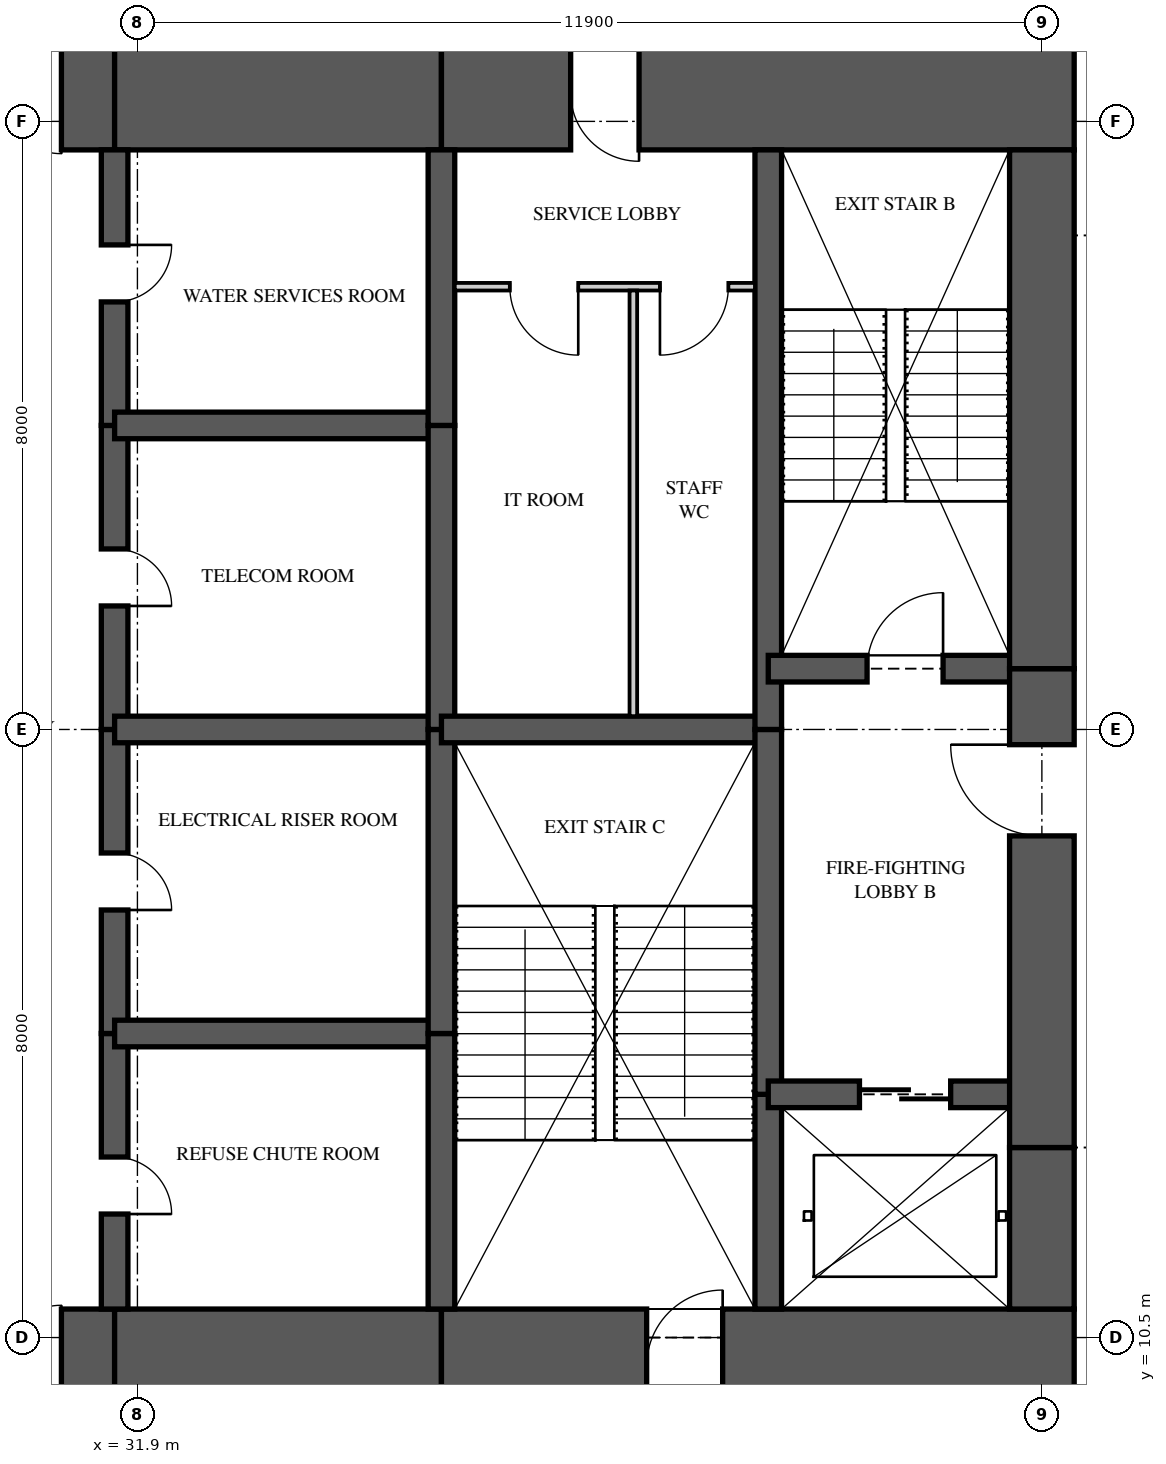
"""IFC4 building model, lengths in metres.
Left out: names, types, materials, properties, quantities, classifications, styles, units other than length and angle.
Written with IfcOpenShell. Run it as: python <this file> out.ifc"""

import sys

from ifc_helpers import new_model, si_unit, direction, frame, frame_2d, origin, place, context, subcontext, project, spatial, rectangle, extrude, element, fill, save


model = new_model("IFC4")
c1 = context("Model", 3, precision=1e-05, world=origin(), true_north=direction((0.0, 1.0)))
c2 = subcontext(c1, "Body", "Model", "MODEL_VIEW")
j1 = project(units=[si_unit("LENGTHUNIT", "METRE"), si_unit("PLANEANGLEUNIT", "RADIAN")], contexts=[c1])
p1 = place(None, origin())
s1 = spatial("IfcSite", under=j1, at=p1, CompositionType="ELEMENT")
p2 = place(p1, origin())
s2 = spatial("IfcBuilding", under=s1, at=p2, CompositionType="ELEMENT")
p3 = place(p2, frame((0.0, 0.0, 121.6)))
s3 = spatial("IfcBuildingStorey", under=s2, at=p3, CompositionType="ELEMENT", Elevation=121.6)
p4 = place(p3, frame((26.0, 10.125, 0.0), z_axis=(0.0, 0.0, 1.0), x_axis=(1.0, 0.0, 0.0)))
e1 = element("IfcWall", 1, at=p4, inside=s3, PredefinedType="SHEAR", context=c2, shape_type="SweptSolid", body=[
    extrude(rectangle(XDim=5.6, YDim=1.5, at=frame_2d((2.8, 0.0))), origin(), (0.0, 0.0, 1.0), 3.35),
])
p5 = place(p4, frame((3.3, 0.0, 0.0)))
e2 = element("IfcOpeningElement", 2, at=p5, cuts=e1, PredefinedType="OPENING", context=c2, shape_type="SweptSolid", body=[
    extrude(rectangle(XDim=1.6, YDim=2.1, at=frame_2d((0.8, 1.05))), frame((0.0, 0.76, 0.0), z_axis=(0.0, -1.0, 0.0), x_axis=(1.0, 0.0, 0.0)), (0.0, 0.0, 1.0), 1.52),
])
p6 = place(p3, frame((31.6, 10.125, 0.0), z_axis=(0.0, 0.0, 1.0), x_axis=(1.0, 0.0, 0.0)))
e3 = element("IfcWall", 3, at=p6, inside=s3, PredefinedType="SHEAR", context=c2, shape_type="SweptSolid", body=[
    extrude(rectangle(XDim=4.3, YDim=1.5, at=frame_2d((2.15, 0.0))), origin(), (0.0, 0.0, 1.0), 3.35),
])
p7 = place(p3, frame((35.9, 10.125, 0.0), z_axis=(0.0, 0.0, 1.0), x_axis=(1.0, 0.0, 0.0)))
e4 = element("IfcWall", 4, at=p7, inside=s3, PredefinedType="SHEAR", context=c2, shape_type="SweptSolid", body=[
    extrude(rectangle(XDim=8.325, YDim=1.5, at=frame_2d((4.163, 0.0))), origin(), (0.0, 0.0, 1.0), 3.35),
])
p8 = place(p7, frame((2.7, 0.0, 0.0)))
e5 = element("IfcOpeningElement", 5, at=p8, cuts=e4, PredefinedType="OPENING", context=c2, shape_type="SweptSolid", body=[
    extrude(rectangle(XDim=1.0, YDim=2.1, at=frame_2d((0.5, 1.05))), frame((0.0, 0.76, 0.0), z_axis=(0.0, -1.0, 0.0), x_axis=(1.0, 0.0, 0.0)), (0.0, 0.0, 1.0), 1.52),
])
p9 = place(p3, frame((44.225, 26.875, 0.0), z_axis=(0.0, 0.0, 1.0), x_axis=(-1.0, 0.0, 0.0)))
e6 = element("IfcWall", 6, at=p9, inside=s3, PredefinedType="SHEAR", context=c2, shape_type="SweptSolid", body=[
    extrude(rectangle(XDim=8.325, YDim=1.5, at=frame_2d((4.163, 0.0))), origin(), (0.0, 0.0, 1.0), 3.35),
])
p10 = place(p9, frame((5.725, 0.0, 0.0)))
e7 = element("IfcOpeningElement", 7, at=p10, cuts=e6, PredefinedType="OPENING", context=c2, shape_type="SweptSolid", body=[
    extrude(rectangle(XDim=0.9, YDim=2.1, at=frame_2d((0.45, 1.05))), frame((0.0, 0.76, 0.0), z_axis=(0.0, -1.0, 0.0), x_axis=(1.0, 0.0, 0.0)), (0.0, 0.0, 1.0), 1.52),
])
p11 = place(p3, frame((35.9, 26.875, 0.0), z_axis=(0.0, 0.0, 1.0), x_axis=(-1.0, 0.0, 0.0)))
e8 = element("IfcWall", 8, at=p11, inside=s3, PredefinedType="SHEAR", context=c2, shape_type="SweptSolid", body=[
    extrude(rectangle(XDim=4.3, YDim=1.5, at=frame_2d((2.15, 0.0))), origin(), (0.0, 0.0, 1.0), 3.35),
])
p12 = place(p3, frame((31.6, 26.875, 0.0), z_axis=(0.0, 0.0, 1.0), x_axis=(-1.0, 0.0, 0.0)))
e9 = element("IfcWall", 9, at=p12, inside=s3, PredefinedType="SHEAR", context=c2, shape_type="SweptSolid", body=[
    extrude(rectangle(XDim=5.6, YDim=1.5, at=frame_2d((2.8, 0.0))), origin(), (0.0, 0.0, 1.0), 3.35),
])
p13 = place(p12, frame((0.7, 0.0, 0.0)))
e10 = element("IfcOpeningElement", 10, at=p13, cuts=e9, PredefinedType="OPENING", context=c2, shape_type="SweptSolid", body=[
    extrude(rectangle(XDim=1.6, YDim=2.1, at=frame_2d((0.8, 1.05))), frame((0.0, 0.76, 0.0), z_axis=(0.0, -1.0, 0.0), x_axis=(1.0, 0.0, 0.0)), (0.0, 0.0, 1.0), 1.52),
])
p14 = place(p3, frame((43.8, 10.875, 0.0), z_axis=(0.0, 0.0, 1.0), x_axis=(0.0, 1.0, 0.0)))
e11 = element("IfcWall", 11, at=p14, inside=s3, PredefinedType="SHEAR", context=c2, shape_type="SweptSolid", body=[
    extrude(rectangle(XDim=2.125, YDim=0.85, at=frame_2d((1.062, 0.0))), origin(), (0.0, 0.0, 1.0), 3.35),
])
p15 = place(p3, frame((43.8, 13.0, 0.0), z_axis=(0.0, 0.0, 1.0), x_axis=(0.0, 1.0, 0.0)))
e12 = element("IfcWall", 12, at=p15, inside=s3, PredefinedType="SHEAR", context=c2, shape_type="SweptSolid", body=[
    extrude(rectangle(XDim=6.3, YDim=0.85, at=frame_2d((3.15, 0.0))), origin(), (0.0, 0.0, 1.0), 3.35),
])
p16 = place(p15, frame((4.1, 0.0, 0.0)))
e13 = element("IfcOpeningElement", 13, at=p16, cuts=e12, PredefinedType="OPENING", context=c2, shape_type="SweptSolid", body=[
    extrude(rectangle(XDim=1.2, YDim=2.2, at=frame_2d((0.6, 1.1))), frame((0.0, 0.435, 0.0), z_axis=(0.0, -1.0, 0.0), x_axis=(1.0, 0.0, 0.0)), (0.0, 0.0, 1.0), 0.87),
])
p17 = place(p3, frame((43.8, 19.3, 0.0), z_axis=(0.0, 0.0, 1.0), x_axis=(0.0, 1.0, 0.0)))
e14 = element("IfcWall", 14, at=p17, inside=s3, PredefinedType="SHEAR", context=c2, shape_type="SweptSolid", body=[
    extrude(rectangle(XDim=6.825, YDim=0.85, at=frame_2d((3.413, 0.0))), origin(), (0.0, 0.0, 1.0), 3.35),
])
p18 = place(p3, frame((31.6, 10.875, 0.0), z_axis=(0.0, 0.0, 1.0), x_axis=(0.0, 1.0, 0.0)))
e15 = element("IfcWall", 15, at=p18, inside=s3, PredefinedType="SHEAR", context=c2, shape_type="SweptSolid", body=[
    extrude(rectangle(XDim=3.625, YDim=0.35, at=frame_2d((1.812, 0.0))), origin(), (0.0, 0.0, 1.0), 3.35),
])
p19 = place(p18, frame((1.25, 0.0, 0.0)))
e16 = element("IfcOpeningElement", 16, at=p19, cuts=e15, PredefinedType="OPENING", context=c2, shape_type="SweptSolid", body=[
    extrude(rectangle(XDim=0.75, YDim=2.1, at=frame_2d((0.375, 1.05))), frame((0.0, 0.185, 0.0), z_axis=(0.0, -1.0, 0.0), x_axis=(1.0, 0.0, 0.0)), (0.0, 0.0, 1.0), 0.37),
])
p20 = place(p3, frame((31.6, 14.5, 0.0), z_axis=(0.0, 0.0, 1.0), x_axis=(0.0, 1.0, 0.0)))
e17 = element("IfcWall", 17, at=p20, inside=s3, PredefinedType="SHEAR", context=c2, shape_type="SweptSolid", body=[
    extrude(rectangle(XDim=4.0, YDim=0.35, at=frame_2d((2.0, 0.0))), origin(), (0.0, 0.0, 1.0), 3.35),
])
p21 = place(p20, frame((1.625, 0.0, 0.0)))
e18 = element("IfcOpeningElement", 18, at=p21, cuts=e17, PredefinedType="OPENING", context=c2, shape_type="SweptSolid", body=[
    extrude(rectangle(XDim=0.75, YDim=2.1, at=frame_2d((0.375, 1.05))), frame((0.0, 0.185, 0.0), z_axis=(0.0, -1.0, 0.0), x_axis=(1.0, 0.0, 0.0)), (0.0, 0.0, 1.0), 0.37),
])
p22 = place(p3, frame((31.6, 18.5, 0.0), z_axis=(0.0, 0.0, 1.0), x_axis=(0.0, 1.0, 0.0)))
e19 = element("IfcWall", 19, at=p22, inside=s3, PredefinedType="SHEAR", context=c2, shape_type="SweptSolid", body=[
    extrude(rectangle(XDim=4.0, YDim=0.35, at=frame_2d((2.0, 0.0))), origin(), (0.0, 0.0, 1.0), 3.35),
])
p23 = place(p22, frame((1.625, 0.0, 0.0)))
e20 = element("IfcOpeningElement", 20, at=p23, cuts=e19, PredefinedType="OPENING", context=c2, shape_type="SweptSolid", body=[
    extrude(rectangle(XDim=0.75, YDim=2.1, at=frame_2d((0.375, 1.05))), frame((0.0, 0.185, 0.0), z_axis=(0.0, -1.0, 0.0), x_axis=(1.0, 0.0, 0.0)), (0.0, 0.0, 1.0), 0.37),
])
p24 = place(p3, frame((31.6, 22.5, 0.0), z_axis=(0.0, 0.0, 1.0), x_axis=(0.0, 1.0, 0.0)))
e21 = element("IfcWall", 21, at=p24, inside=s3, PredefinedType="SHEAR", context=c2, shape_type="SweptSolid", body=[
    extrude(rectangle(XDim=3.625, YDim=0.35, at=frame_2d((1.812, 0.0))), origin(), (0.0, 0.0, 1.0), 3.35),
])
p25 = place(p24, frame((1.625, 0.0, 0.0)))
e22 = element("IfcOpeningElement", 22, at=p25, cuts=e21, PredefinedType="OPENING", context=c2, shape_type="SweptSolid", body=[
    extrude(rectangle(XDim=0.75, YDim=2.1, at=frame_2d((0.375, 1.05))), frame((0.0, 0.185, 0.0), z_axis=(0.0, -1.0, 0.0), x_axis=(1.0, 0.0, 0.0)), (0.0, 0.0, 1.0), 0.37),
])
p26 = place(p3, frame((35.9, 10.875, 0.0), z_axis=(0.0, 0.0, 1.0), x_axis=(0.0, 1.0, 0.0)))
e23 = element("IfcWall", 23, at=p26, inside=s3, PredefinedType="SHEAR", context=c2, shape_type="SweptSolid", body=[
    extrude(rectangle(XDim=3.625, YDim=0.35, at=frame_2d((1.812, 0.0))), origin(), (0.0, 0.0, 1.0), 3.35),
])
for number, where, z_axis, x_axis in (
    (24, (35.9, 14.5, 0.0), (0.0, 0.0, 1.0), (0.0, 1.0, 0.0)),
    (25, (35.9, 18.5, 0.0), (0.0, 0.0, 1.0), (0.0, 1.0, 0.0)),
):
    element("IfcWall", number, at=place(p3, frame(where, z_axis=z_axis, x_axis=x_axis)), inside=s3, PredefinedType="SHEAR", context=c2, shape_type="SweptSolid", body=[
        extrude(rectangle(XDim=4.0, YDim=0.35, at=frame_2d((2.0, 0.0))), origin(), (0.0, 0.0, 1.0), 3.35),
    ])
p27 = place(p3, frame((35.9, 22.5, 0.0), z_axis=(0.0, 0.0, 1.0), x_axis=(0.0, 1.0, 0.0)))
e26 = element("IfcWall", 26, at=p27, inside=s3, PredefinedType="SHEAR", context=c2, shape_type="SweptSolid", body=[
    extrude(rectangle(XDim=3.625, YDim=0.35, at=frame_2d((1.812, 0.0))), origin(), (0.0, 0.0, 1.0), 3.35),
])
p28 = place(p3, frame((40.2, 10.875, 0.0), z_axis=(0.0, 0.0, 1.0), x_axis=(0.0, 1.0, 0.0)))
e27 = element("IfcWall", 27, at=p28, inside=s3, PredefinedType="SHEAR", context=c2, shape_type="SweptSolid", body=[
    extrude(rectangle(XDim=2.825, YDim=0.35, at=frame_2d((1.413, 0.0))), origin(), (0.0, 0.0, 1.0), 3.35),
])
p29 = place(p3, frame((40.2, 13.7, 0.0), z_axis=(0.0, 0.0, 1.0), x_axis=(0.0, 1.0, 0.0)))
e28 = element("IfcWall", 28, at=p29, inside=s3, PredefinedType="SHEAR", context=c2, shape_type="SweptSolid", body=[
    extrude(rectangle(XDim=4.8, YDim=0.35, at=frame_2d((2.4, 0.0))), origin(), (0.0, 0.0, 1.0), 3.35),
])
p30 = place(p3, frame((40.2, 18.5, 0.0), z_axis=(0.0, 0.0, 1.0), x_axis=(0.0, 1.0, 0.0)))
e29 = element("IfcWall", 29, at=p30, inside=s3, PredefinedType="SHEAR", context=c2, shape_type="SweptSolid", body=[
    extrude(rectangle(XDim=7.625, YDim=0.35, at=frame_2d((3.812, 0.0))), origin(), (0.0, 0.0, 1.0), 3.35),
])
for number, where, z_axis, x_axis in (
    (30, (31.6, 14.5, 0.0), (0.0, 0.0, 1.0), (1.0, 0.0, 0.0)),
    (31, (31.6, 18.5, 0.0), (0.0, 0.0, 1.0), (1.0, 0.0, 0.0)),
    (32, (31.6, 22.5, 0.0), (0.0, 0.0, 1.0), (1.0, 0.0, 0.0)),
):
    element("IfcWall", number, at=place(p3, frame(where, z_axis=z_axis, x_axis=x_axis)), inside=s3, PredefinedType="SHEAR", context=c2, shape_type="SweptSolid", body=[
        extrude(rectangle(XDim=4.3, YDim=0.35, at=frame_2d((2.15, 0.0))), origin(), (0.0, 0.0, 1.0), 3.35),
    ])
p31 = place(p3, frame((35.9, 18.5, 0.0), z_axis=(0.0, 0.0, 1.0), x_axis=(1.0, 0.0, 0.0)))
e33 = element("IfcWall", 33, at=p31, inside=s3, PredefinedType="SHEAR", context=c2, shape_type="SweptSolid", body=[
    extrude(rectangle(XDim=4.3, YDim=0.35, at=frame_2d((2.15, 0.0))), origin(), (0.0, 0.0, 1.0), 3.35),
])
p32 = place(p3, frame((40.2, 13.7, 0.0), z_axis=(0.0, 0.0, 1.0), x_axis=(1.0, 0.0, 0.0)))
e34 = element("IfcWall", 34, at=p32, inside=s3, PredefinedType="SHEAR", context=c2, shape_type="SweptSolid", body=[
    extrude(rectangle(XDim=3.6, YDim=0.35, at=frame_2d((1.8, 0.0))), origin(), (0.0, 0.0, 1.0), 3.35),
])
p33 = place(p32, frame((1.2, 0.0, 0.0)))
e35 = element("IfcOpeningElement", 35, at=p33, cuts=e34, PredefinedType="OPENING", context=c2, shape_type="SweptSolid", body=[
    extrude(rectangle(XDim=1.2, YDim=2.1, at=frame_2d((0.6, 1.05))), frame((0.0, 0.185, 0.0), z_axis=(0.0, -1.0, 0.0), x_axis=(1.0, 0.0, 0.0)), (0.0, 0.0, 1.0), 0.37),
])
p34 = place(p3, frame((40.2, 19.3, 0.0), z_axis=(0.0, 0.0, 1.0), x_axis=(1.0, 0.0, 0.0)))
e36 = element("IfcWall", 36, at=p34, inside=s3, PredefinedType="SHEAR", context=c2, shape_type="SweptSolid", body=[
    extrude(rectangle(XDim=3.6, YDim=0.35, at=frame_2d((1.8, 0.0))), origin(), (0.0, 0.0, 1.0), 3.35),
])
p35 = place(p34, frame((1.3, 0.0, 0.0)))
e37 = element("IfcOpeningElement", 37, at=p35, cuts=e36, PredefinedType="OPENING", context=c2, shape_type="SweptSolid", body=[
    extrude(rectangle(XDim=1.0, YDim=2.1, at=frame_2d((0.5, 1.05))), frame((0.0, 0.185, 0.0), z_axis=(0.0, -1.0, 0.0), x_axis=(1.0, 0.0, 0.0)), (0.0, 0.0, 1.0), 0.37),
])
p36 = place(p3, frame((36.075, 24.325, 0.0), z_axis=(0.0, 0.0, 1.0), x_axis=(1.0, 0.0, 0.0)))
e38 = element("IfcWall", 38, at=p36, inside=s3, PredefinedType="PARTITIONING", context=c2, shape_type="SweptSolid", body=[
    extrude(rectangle(XDim=3.95, YDim=0.1, at=frame_2d((1.975, 0.0))), origin(), (0.0, 0.0, 1.0), 3.11),
])
p37 = place(p36, frame((0.725, 0.0, 0.0)))
e39 = element("IfcOpeningElement", 39, at=p37, cuts=e38, PredefinedType="OPENING", context=c2, shape_type="SweptSolid", body=[
    extrude(rectangle(XDim=0.9, YDim=2.1, at=frame_2d((0.45, 1.05))), frame((0.0, 0.06, 0.0), z_axis=(0.0, -1.0, 0.0), x_axis=(1.0, 0.0, 0.0)), (0.0, 0.0, 1.0), 0.12),
])
p38 = place(p36, frame((2.7, 0.0, 0.0)))
e40 = element("IfcOpeningElement", 40, at=p38, cuts=e38, PredefinedType="OPENING", context=c2, shape_type="SweptSolid", body=[
    extrude(rectangle(XDim=0.9, YDim=2.1, at=frame_2d((0.45, 1.05))), frame((0.0, 0.06, 0.0), z_axis=(0.0, -1.0, 0.0), x_axis=(1.0, 0.0, 0.0)), (0.0, 0.0, 1.0), 0.12),
])
p39 = place(p3, frame((38.425, 18.675, 0.0), z_axis=(0.0, 0.0, 1.0), x_axis=(0.0, 1.0, 0.0)))
e41 = element("IfcWall", 41, at=p39, inside=s3, PredefinedType="PARTITIONING", context=c2, shape_type="SweptSolid", body=[
    extrude(rectangle(XDim=5.6, YDim=0.1, at=frame_2d((2.8, 0.0))), origin(), (0.0, 0.0, 1.0), 3.11),
])
p40 = place(p37, frame((0.9, 0.0, 0.0), z_axis=(0.0, 0.0, 1.0), x_axis=(-1.0, 0.0, 0.0)))
e42 = element("IfcDoor", 42, at=p40, inside=s3, OperationType="SINGLE_SWING_LEFT", PredefinedType="DOOR", context=c2, shape_type="SweptSolid", body=[
    extrude(rectangle(XDim=0.9, YDim=2.1, at=frame_2d((0.45, 1.05))), frame((0.0, 0.025, 0.0), z_axis=(0.0, -1.0, 0.0), x_axis=(1.0, 0.0, 0.0)), (0.0, 0.0, 1.0), 0.05),
])
fill(e39, e42)
p41 = place(p38, frame((0.9, 0.0, 0.0), z_axis=(0.0, 0.0, 1.0), x_axis=(-1.0, 0.0, 0.0)))
e43 = element("IfcDoor", 43, at=p41, inside=s3, OperationType="SINGLE_SWING_RIGHT", PredefinedType="DOOR", context=c2, shape_type="SweptSolid", body=[
    extrude(rectangle(XDim=0.9, YDim=2.1, at=frame_2d((0.45, 1.05))), frame((0.0, 0.025, 0.0), z_axis=(0.0, -1.0, 0.0), x_axis=(1.0, 0.0, 0.0)), (0.0, 0.0, 1.0), 0.05),
])
fill(e40, e43)
p42 = place(p35, origin())
e44 = element("IfcDoor", 44, at=p42, inside=s3, OperationType="SINGLE_SWING_RIGHT", PredefinedType="DOOR", context=c2, shape_type="SweptSolid", body=[
    extrude(rectangle(XDim=1.0, YDim=2.1, at=frame_2d((0.5, 1.05))), frame((0.0, 0.025, 0.0), z_axis=(0.0, -1.0, 0.0), x_axis=(1.0, 0.0, 0.0)), (0.0, 0.0, 1.0), 0.05),
])
fill(e37, e44)
p43 = place(p16, origin())
e45 = element("IfcDoor", 45, at=p43, inside=s3, OperationType="SINGLE_SWING_RIGHT", PredefinedType="DOOR", context=c2, shape_type="SweptSolid", body=[
    extrude(rectangle(XDim=1.2, YDim=2.2, at=frame_2d((0.6, 1.1))), frame((0.0, 0.025, 0.0), z_axis=(0.0, -1.0, 0.0), x_axis=(1.0, 0.0, 0.0)), (0.0, 0.0, 1.0), 0.05),
])
fill(e13, e45)
p44 = place(p33, origin())
e46 = element("IfcDoor", 46, at=p44, inside=s3, OperationType="SLIDING_TO_LEFT", PredefinedType="DOOR", context=c2, shape_type="SweptSolid", body=[
    extrude(rectangle(XDim=1.2, YDim=2.1, at=frame_2d((0.6, 1.05))), frame((0.0, 0.025, 0.0), z_axis=(0.0, -1.0, 0.0), x_axis=(1.0, 0.0, 0.0)), (0.0, 0.0, 1.0), 0.05),
])
fill(e35, e46)
p45 = place(p5, origin())
e47 = element("IfcDoor", 47, at=p45, inside=s3, OperationType="DOUBLE_DOOR_SINGLE_SWING", PredefinedType="DOOR", context=c2, shape_type="SweptSolid", body=[
    extrude(rectangle(XDim=1.6, YDim=2.1, at=frame_2d((0.8, 1.05))), frame((0.0, 0.025, 0.0), z_axis=(0.0, -1.0, 0.0), x_axis=(1.0, 0.0, 0.0)), (0.0, 0.0, 1.0), 0.05),
])
fill(e2, e47)
p46 = place(p13, origin())
e48 = element("IfcDoor", 48, at=p46, inside=s3, OperationType="DOUBLE_DOOR_SINGLE_SWING", PredefinedType="DOOR", context=c2, shape_type="SweptSolid", body=[
    extrude(rectangle(XDim=1.6, YDim=2.1, at=frame_2d((0.8, 1.05))), frame((0.0, 0.025, 0.0), z_axis=(0.0, -1.0, 0.0), x_axis=(1.0, 0.0, 0.0)), (0.0, 0.0, 1.0), 0.05),
])
fill(e10, e48)
p47 = place(p19, frame((0.75, 0.0, 0.0), z_axis=(0.0, 0.0, 1.0), x_axis=(-1.0, 0.0, 0.0)))
e49 = element("IfcDoor", 49, at=p47, inside=s3, OperationType="SINGLE_SWING_RIGHT", PredefinedType="DOOR", context=c2, shape_type="SweptSolid", body=[
    extrude(rectangle(XDim=0.75, YDim=2.1, at=frame_2d((0.375, 1.05))), frame((0.0, 0.025, 0.0), z_axis=(0.0, -1.0, 0.0), x_axis=(1.0, 0.0, 0.0)), (0.0, 0.0, 1.0), 0.05),
])
fill(e16, e49)
p48 = place(p21, frame((0.75, 0.0, 0.0), z_axis=(0.0, 0.0, 1.0), x_axis=(-1.0, 0.0, 0.0)))
e50 = element("IfcDoor", 50, at=p48, inside=s3, OperationType="SINGLE_SWING_RIGHT", PredefinedType="DOOR", context=c2, shape_type="SweptSolid", body=[
    extrude(rectangle(XDim=0.75, YDim=2.1, at=frame_2d((0.375, 1.05))), frame((0.0, 0.025, 0.0), z_axis=(0.0, -1.0, 0.0), x_axis=(1.0, 0.0, 0.0)), (0.0, 0.0, 1.0), 0.05),
])
fill(e18, e50)
p49 = place(p23, frame((0.75, 0.0, 0.0), z_axis=(0.0, 0.0, 1.0), x_axis=(-1.0, 0.0, 0.0)))
e51 = element("IfcDoor", 51, at=p49, inside=s3, OperationType="SINGLE_SWING_RIGHT", PredefinedType="DOOR", context=c2, shape_type="SweptSolid", body=[
    extrude(rectangle(XDim=0.75, YDim=2.1, at=frame_2d((0.375, 1.05))), frame((0.0, 0.025, 0.0), z_axis=(0.0, -1.0, 0.0), x_axis=(1.0, 0.0, 0.0)), (0.0, 0.0, 1.0), 0.05),
])
fill(e20, e51)
p50 = place(p25, frame((0.75, 0.0, 0.0), z_axis=(0.0, 0.0, 1.0), x_axis=(-1.0, 0.0, 0.0)))
e52 = element("IfcDoor", 52, at=p50, inside=s3, OperationType="SINGLE_SWING_LEFT", PredefinedType="DOOR", context=c2, shape_type="SweptSolid", body=[
    extrude(rectangle(XDim=0.75, YDim=2.1, at=frame_2d((0.375, 1.05))), frame((0.0, 0.025, 0.0), z_axis=(0.0, -1.0, 0.0), x_axis=(1.0, 0.0, 0.0)), (0.0, 0.0, 1.0), 0.05),
])
fill(e22, e52)
p51 = place(p8, origin())
e53 = element("IfcDoor", 53, at=p51, inside=s3, OperationType="SINGLE_SWING_RIGHT", PredefinedType="DOOR", context=c2, shape_type="SweptSolid", body=[
    extrude(rectangle(XDim=1.0, YDim=2.1, at=frame_2d((0.5, 1.05))), frame((0.0, 0.025, 0.0), z_axis=(0.0, -1.0, 0.0), x_axis=(1.0, 0.0, 0.0)), (0.0, 0.0, 1.0), 0.05),
])
fill(e5, e53)
p52 = place(p10, origin())
e54 = element("IfcDoor", 54, at=p52, inside=s3, OperationType="SINGLE_SWING_LEFT", PredefinedType="DOOR", context=c2, shape_type="SweptSolid", body=[
    extrude(rectangle(XDim=0.9, YDim=2.1, at=frame_2d((0.45, 1.05))), frame((0.0, 0.47, 0.0), z_axis=(0.0, -1.0, 0.0), x_axis=(1.0, 0.0, 0.0)), (0.0, 0.0, 1.0), 0.8),
])
fill(e7, e54)
save(model, sys.argv[1])
